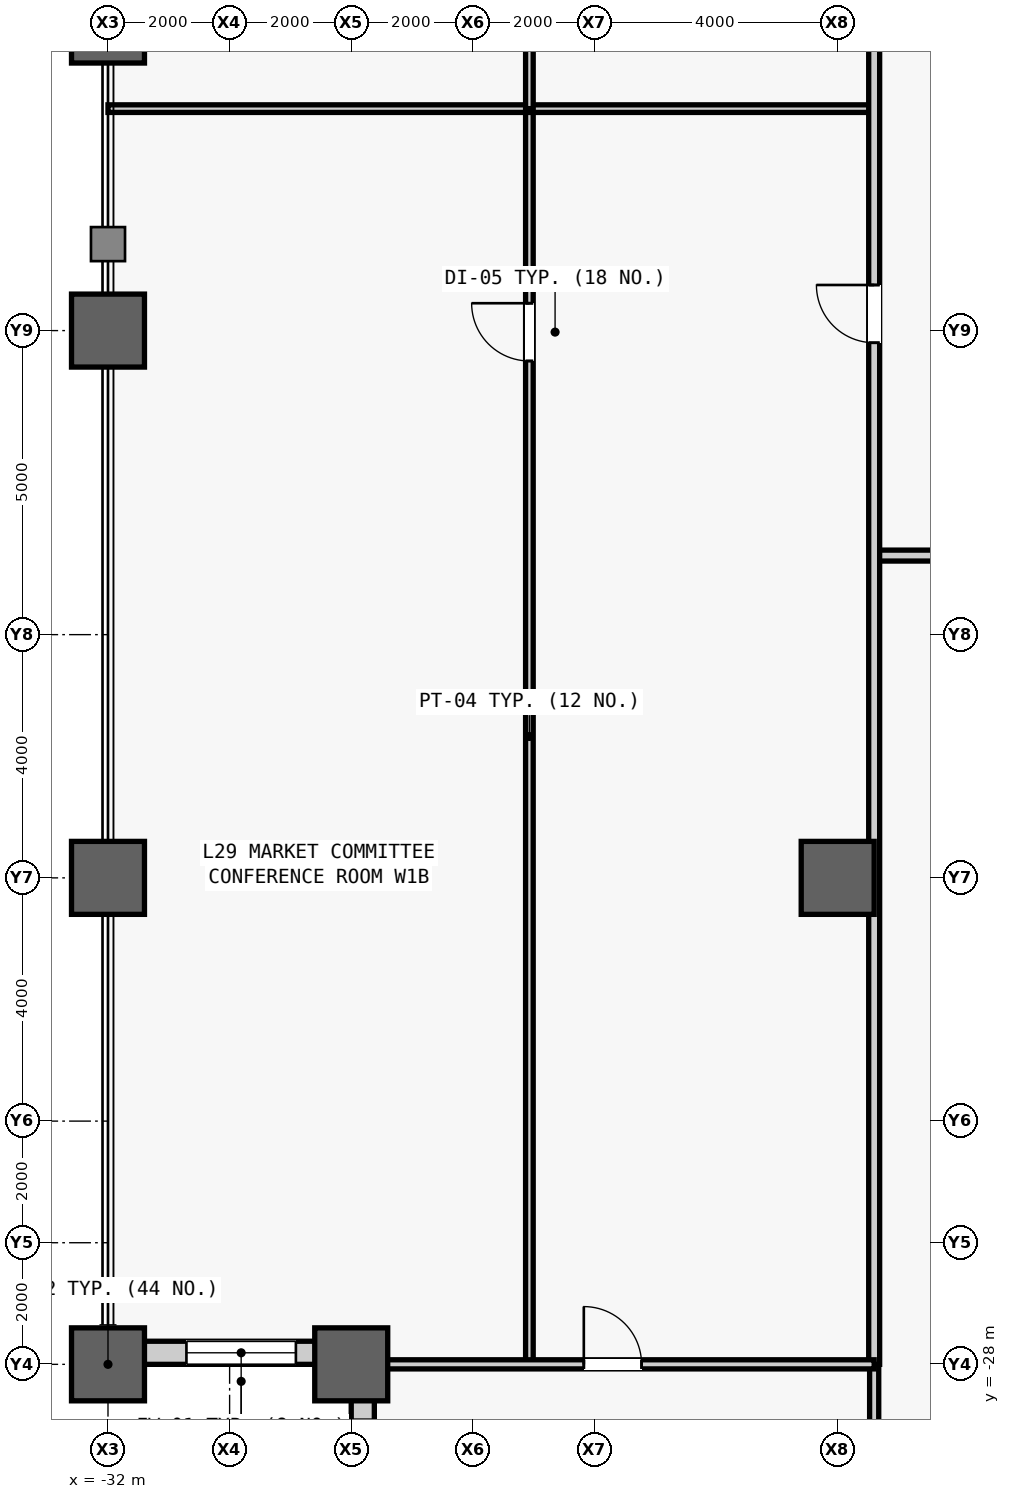
"""IFC4 building model, lengths in metres.
Left out: names, types, materials, properties, quantities, classifications, styles, units other than length and angle.
Written with IfcOpenShell. Run it as: python <this file> out.ifc"""

import sys

from ifc_helpers import new_model, si_unit, direction, frame, frame_2d, origin, origin_2d, place, context, subcontext, project, spatial, rectangle, hollow_rectangle, extrude, source, transform, mapped, element, fill, save


model = new_model("IFC4")
c1 = context("Model", 3, precision=1e-05, world=origin(), true_north=direction((0.0, 1.0)))
c2 = subcontext(c1, "Body", "Model", "MODEL_VIEW")
j1 = project(units=[si_unit("LENGTHUNIT", "METRE"), si_unit("PLANEANGLEUNIT", "RADIAN")], contexts=[c1])
p1 = place(None, origin())
s1 = spatial("IfcSite", under=j1, at=p1, CompositionType="ELEMENT")
p2 = place(p1, origin())
s2 = spatial("IfcBuilding", under=s1, at=p2, CompositionType="ELEMENT")
p3 = place(p2, frame((0.0, 0.0, 128.3)))
s3 = spatial("IfcBuildingStorey", under=s2, at=p3, CompositionType="ELEMENT", Elevation=128.3)
m1 = source(origin(), c2, "Body", "SweptSolid", [
    extrude(hollow_rectangle(XDim=1.2, YDim=1.2, WallThickness=0.07, at=origin_2d()), origin(), (0.0, 0.0, 1.0), 4.1),
])
for number, where, z_axis, x_axis in (
    (1, (-32.0, -28.0, 0.0), (0.0, 0.0, 1.0), (1.0, 0.0, 0.0)),
    (2, (-32.0, -20.0, 0.0), (0.0, 0.0, 1.0), (1.0, 0.0, 0.0)),
    (3, (-32.0, -11.0, 0.0), (0.0, 0.0, 1.0), (1.0, 0.0, 0.0)),
    (4, (-32.0, -6.0, 0.0), (0.0, 0.0, 1.0), (1.0, 0.0, 0.0)),
    (5, (-28.0, -28.0, 0.0), (0.0, 0.0, 1.0), (1.0, 0.0, 0.0)),
    (6, (-20.0, -20.0, 0.0), (0.0, 0.0, 1.0), (1.0, 0.0, 0.0)),
):
    element("IfcColumn", number, at=place(p3, frame(where, z_axis=z_axis, x_axis=x_axis)), inside=s3, PredefinedType="COLUMN", context=c2, shape_type="MappedRepresentation", body=[
        mapped(m1, transform((0.0, 0.0, 0.0), scale=1.0)),
    ])
m2 = source(origin(), c2, "Body", "SweptSolid", [
    extrude(rectangle(XDim=3.62, YDim=0.38, at=frame_2d((1.81, 0.0))), origin(), (0.0, 0.0, 1.0), 3.145),
])
p4 = place(p3, frame((-28.0, -27.81, 0.0), z_axis=(0.0, 0.0, 1.0), x_axis=(-1.0, 0.0, 0.0)))
e7 = element("IfcWall", 7, at=p4, inside=s3, PredefinedType="STANDARD", context=c2, shape_type="MappedRepresentation", body=[
    mapped(m2, transform((0.0, 0.0, 0.0), scale=1.0)),
])
m3 = source(origin(), c2, "Body", "SweptSolid", [
    extrude(rectangle(XDim=1.8, YDim=2.4, at=frame_2d((0.9, 1.2))), frame((0.0, 0.2, 0.0), z_axis=(0.0, -1.0, 0.0), x_axis=(1.0, 0.0, 0.0)), (0.0, 0.0, 1.0), 0.4),
])
p5 = place(p4, frame((0.91, 0.0, 0.5)))
e8 = element("IfcOpeningElement", 8, at=p5, cuts=e7, PredefinedType="OPENING", context=c2, shape_type="MappedRepresentation", body=[
    mapped(m3, transform((0.0, 0.0, 0.0), scale=1.0)),
])
p6 = place(p3, frame((-27.81, -31.62, 0.0), z_axis=(0.0, 0.0, 1.0), x_axis=(0.0, 1.0, 0.0)))
e9 = element("IfcWall", 9, at=p6, inside=s3, PredefinedType="STANDARD", context=c2, shape_type="MappedRepresentation", body=[
    mapped(m2, transform((0.0, 0.0, 0.0), scale=1.0)),
])
p7 = place(p6, frame((0.91, 0.0, 0.5)))
e10 = element("IfcOpeningElement", 10, at=p7, cuts=e9, PredefinedType="OPENING", context=c2, shape_type="MappedRepresentation", body=[
    mapped(m3, transform((0.0, 0.0, 0.0), scale=1.0)),
])
m4 = source(origin(), c2, "Body", "SweptSolid", [
    extrude(rectangle(XDim=37.1, YDim=0.18, at=frame_2d((18.55, 0.0))), origin(), (0.0, 0.0, 1.0), 3.84),
])
p8 = place(p3, frame((-19.4, -14.7, 0.0), z_axis=(0.0, 0.0, 1.0), x_axis=(1.0, 0.0, 0.0)))
e11 = element("IfcWall", 11, at=p8, inside=s3, PredefinedType="PARTITIONING", context=c2, shape_type="MappedRepresentation", body=[
    mapped(m4, transform((0.0, 0.0, 0.0), scale=1.0)),
])
m5 = source(origin(), c2, "Body", "SweptSolid", [
    extrude(rectangle(XDim=1.05, YDim=2.2, at=frame_2d((0.525, 1.1))), frame((0.0, 0.1, 0.0), z_axis=(0.0, -1.0, 0.0), x_axis=(1.0, 0.0, 0.0)), (0.0, 0.0, 1.0), 0.2),
])
p9 = place(p8, frame((6.056, 0.0, 0.0)))
e12 = element("IfcOpeningElement", 12, at=p9, cuts=e11, PredefinedType="OPENING", context=c2, shape_type="MappedRepresentation", body=[
    mapped(m5, transform((0.0, 0.0, 0.0), scale=1.0)),
])
p10 = place(p8, frame((12.46, 0.0, 0.0)))
e13 = element("IfcOpeningElement", 13, at=p10, cuts=e11, PredefinedType="OPENING", context=c2, shape_type="MappedRepresentation", body=[
    mapped(m5, transform((0.0, 0.0, 0.0), scale=1.0)),
])
p11 = place(p8, frame((22.477, 0.0, 0.0)))
e14 = element("IfcOpeningElement", 14, at=p11, cuts=e11, PredefinedType="OPENING", context=c2, shape_type="MappedRepresentation", body=[
    mapped(m5, transform((0.0, 0.0, 0.0), scale=1.0)),
])
p12 = place(p8, frame((30.473, 0.0, 0.0)))
e15 = element("IfcOpeningElement", 15, at=p12, cuts=e11, PredefinedType="OPENING", context=c2, shape_type="MappedRepresentation", body=[
    mapped(m5, transform((0.0, 0.0, 0.0), scale=1.0)),
])
m6 = source(origin(), c2, "Body", "SweptSolid", [
    extrude(rectangle(XDim=4.0, YDim=0.15, at=frame_2d((2.0, 0.0))), origin(), (0.0, 0.0, 1.0), 3.84),
])
p13 = place(p3, frame((-19.4, -32.0, 0.0), z_axis=(0.0, 0.0, 1.0), x_axis=(0.0, 1.0, 0.0)))
e16 = element("IfcWall", 16, at=p13, inside=s3, PredefinedType="PARTITIONING", context=c2, shape_type="MappedRepresentation", body=[
    mapped(m6, transform((0.0, 0.0, 0.0), scale=1.0)),
])
m7 = source(origin(), c2, "Body", "SweptSolid", [
    extrude(rectangle(XDim=20.65, YDim=0.125, at=frame_2d((10.325, 0.0))), origin(), (0.0, 0.0, 1.0), 3.84),
])
p14 = place(p3, frame((-25.07, -28.0, 0.0), z_axis=(0.0, 0.0, 1.0), x_axis=(0.0, 1.0, 0.0)))
e17 = element("IfcWall", 17, at=p14, inside=s3, PredefinedType="PARTITIONING", context=c2, shape_type="MappedRepresentation", body=[
    mapped(m7, transform((0.0, 0.0, 0.0), scale=1.0)),
])
m8 = source(origin(), c2, "Body", "SweptSolid", [
    extrude(rectangle(XDim=0.95, YDim=2.15, at=frame_2d((0.475, 1.075))), frame((0.0, 0.073, 0.0), z_axis=(0.0, -1.0, 0.0), x_axis=(1.0, 0.0, 0.0)), (0.0, 0.0, 1.0), 0.145),
])
p15 = place(p14, frame((16.5, 0.0, 0.0)))
e18 = element("IfcOpeningElement", 18, at=p15, cuts=e17, PredefinedType="OPENING", context=c2, shape_type="MappedRepresentation", body=[
    mapped(m8, transform((0.0, 0.0, 0.0), scale=1.0)),
])
m9 = source(origin(), c2, "Body", "SweptSolid", [
    extrude(rectangle(XDim=12.6, YDim=0.125, at=frame_2d((6.3, 0.0))), origin(), (0.0, 0.0, 1.0), 3.84),
])
p16 = place(p3, frame((-32.0, -7.35, 0.0), z_axis=(0.0, 0.0, 1.0), x_axis=(1.0, 0.0, 0.0)))
e19 = element("IfcWall", 19, at=p16, inside=s3, PredefinedType="PARTITIONING", context=c2, shape_type="MappedRepresentation", body=[
    mapped(m9, transform((0.0, 0.0, 0.0), scale=1.0)),
])
m10 = source(origin(), c2, "Body", "SweptSolid", [
    extrude(rectangle(XDim=9.114, YDim=0.125, at=frame_2d((4.557, 0.0))), origin(), (0.0, 0.0, 1.0), 3.84),
])
p17 = place(p3, frame((-25.07, -7.35, 0.0), z_axis=(0.0, 0.0, 1.0), x_axis=(0.0, 1.0, 0.0)))
e20 = element("IfcWall", 20, at=p17, inside=s3, PredefinedType="PARTITIONING", context=c2, shape_type="MappedRepresentation", body=[
    mapped(m10, transform((0.0, 0.0, 0.0), scale=1.0)),
])
p18 = place(p17, frame((4.082, 0.0, 0.0)))
e21 = element("IfcOpeningElement", 21, at=p18, cuts=e20, PredefinedType="OPENING", context=c2, shape_type="MappedRepresentation", body=[
    mapped(m8, transform((0.0, 0.0, 0.0), scale=1.0)),
])
m11 = source(origin(), c2, "Body", "SweptSolid", [
    extrude(rectangle(XDim=56.0, YDim=0.18, at=frame_2d((28.0, 0.0))), origin(), (0.0, 0.0, 1.0), 3.371),
])
p19 = place(p3, frame((-19.4, -28.0, 0.0), z_axis=(0.0, 0.0, 1.0), x_axis=(0.0, 1.0, 0.0)))
e22 = element("IfcWall", 22, at=p19, inside=s3, PredefinedType="PARTITIONING", context=c2, shape_type="MappedRepresentation", body=[
    mapped(m11, transform((0.0, 0.0, 0.0), scale=1.0)),
])
m12 = source(origin(), c2, "Body", "SweptSolid", [
    extrude(rectangle(XDim=0.95, YDim=2.15, at=frame_2d((0.475, 1.075))), frame((0.0, 0.1, 0.0), z_axis=(0.0, -1.0, 0.0), x_axis=(1.0, 0.0, 0.0)), (0.0, 0.0, 1.0), 0.2),
])
p20 = place(p19, frame((16.8, 0.0, 0.0)))
e23 = element("IfcOpeningElement", 23, at=p20, cuts=e22, PredefinedType="OPENING", context=c2, shape_type="MappedRepresentation", body=[
    mapped(m12, transform((0.0, 0.0, 0.0), scale=1.0)),
])
p21 = place(p19, frame((24.732, 0.0, 0.0)))
e24 = element("IfcOpeningElement", 24, at=p21, cuts=e22, PredefinedType="OPENING", context=c2, shape_type="MappedRepresentation", body=[
    mapped(m12, transform((0.0, 0.0, 0.0), scale=1.0)),
])
p22 = place(p19, frame((33.111, 0.0, 0.0)))
e25 = element("IfcOpeningElement", 25, at=p22, cuts=e22, PredefinedType="OPENING", context=c2, shape_type="MappedRepresentation", body=[
    mapped(m12, transform((0.0, 0.0, 0.0), scale=1.0)),
])
p23 = place(p19, frame((39.279, 0.0, 0.0)))
e26 = element("IfcOpeningElement", 26, at=p23, cuts=e22, PredefinedType="OPENING", context=c2, shape_type="MappedRepresentation", body=[
    mapped(m12, transform((0.0, 0.0, 0.0), scale=1.0)),
])
m13 = source(origin(), c2, "Body", "SweptSolid", [
    extrude(rectangle(XDim=8.6, YDim=0.15, at=frame_2d((4.3, 0.0))), origin(), (0.0, 0.0, 1.0), 3.84),
])
p24 = place(p3, frame((-28.0, -28.0, 0.0), z_axis=(0.0, 0.0, 1.0), x_axis=(1.0, 0.0, 0.0)))
e27 = element("IfcWall", 27, at=p24, inside=s3, PredefinedType="PARTITIONING", context=c2, shape_type="MappedRepresentation", body=[
    mapped(m13, transform((0.0, 0.0, 0.0), scale=1.0)),
])
m14 = source(origin(), c2, "Body", "SweptSolid", [
    extrude(rectangle(XDim=0.95, YDim=2.15, at=frame_2d((0.475, 1.075))), frame((0.0, 0.085, 0.0), z_axis=(0.0, -1.0, 0.0), x_axis=(1.0, 0.0, 0.0)), (0.0, 0.0, 1.0), 0.17),
])
p25 = place(p24, frame((3.825, 0.0, 0.0)))
e28 = element("IfcOpeningElement", 28, at=p25, cuts=e27, PredefinedType="OPENING", context=c2, shape_type="MappedRepresentation", body=[
    mapped(m14, transform((0.0, 0.0, 0.0), scale=1.0)),
])
m15 = source(origin(), c2, "Body", "SweptSolid", [
    extrude(rectangle(XDim=1.8, YDim=2.4, at=frame_2d((0.9, 1.2))), frame((0.0, 0.03, 0.0), z_axis=(0.0, -1.0, 0.0), x_axis=(1.0, 0.0, 0.0)), (0.0, 0.0, 1.0), 0.06),
])
p26 = place(p5, origin())
e29 = element("IfcWindow", 29, at=p26, inside=s3, PartitioningType="SINGLE_PANEL", PredefinedType="WINDOW", context=c2, shape_type="MappedRepresentation", body=[
    mapped(m15, transform((0.0, 0.0, 0.0), scale=1.0)),
])
fill(e8, e29)
p27 = place(p7, origin())
e30 = element("IfcWindow", 30, at=p27, inside=s3, PartitioningType="SINGLE_PANEL", PredefinedType="WINDOW", context=c2, shape_type="MappedRepresentation", body=[
    mapped(m15, transform((0.0, 0.0, 0.0), scale=1.0)),
])
fill(e10, e30)
m16 = source(origin(), c2, "Body", "SweptSolid", [
    extrude(rectangle(XDim=0.95, YDim=2.15, at=frame_2d((0.475, 1.075))), frame((0.0, 0.025, 0.0), z_axis=(0.0, -1.0, 0.0), x_axis=(1.0, 0.0, 0.0)), (0.0, 0.0, 1.0), 0.05),
])
p28 = place(p15, origin())
e31 = element("IfcDoor", 31, at=p28, inside=s3, OperationType="SINGLE_SWING_RIGHT", PredefinedType="DOOR", context=c2, shape_type="MappedRepresentation", body=[
    mapped(m16, transform((0.0, 0.0, 0.0), scale=1.0)),
])
fill(e18, e31)
p29 = place(p20, origin())
e32 = element("IfcDoor", 32, at=p29, inside=s3, OperationType="SINGLE_SWING_RIGHT", PredefinedType="DOOR", context=c2, shape_type="MappedRepresentation", body=[
    mapped(m16, transform((0.0, 0.0, 0.0), scale=1.0)),
])
fill(e23, e32)
p30 = place(p25, origin())
e33 = element("IfcDoor", 33, at=p30, inside=s3, OperationType="SINGLE_SWING_LEFT", PredefinedType="DOOR", context=c2, shape_type="MappedRepresentation", body=[
    mapped(m16, transform((0.0, 0.0, 0.0), scale=1.0)),
])
fill(e28, e33)
save(model, sys.argv[1])
